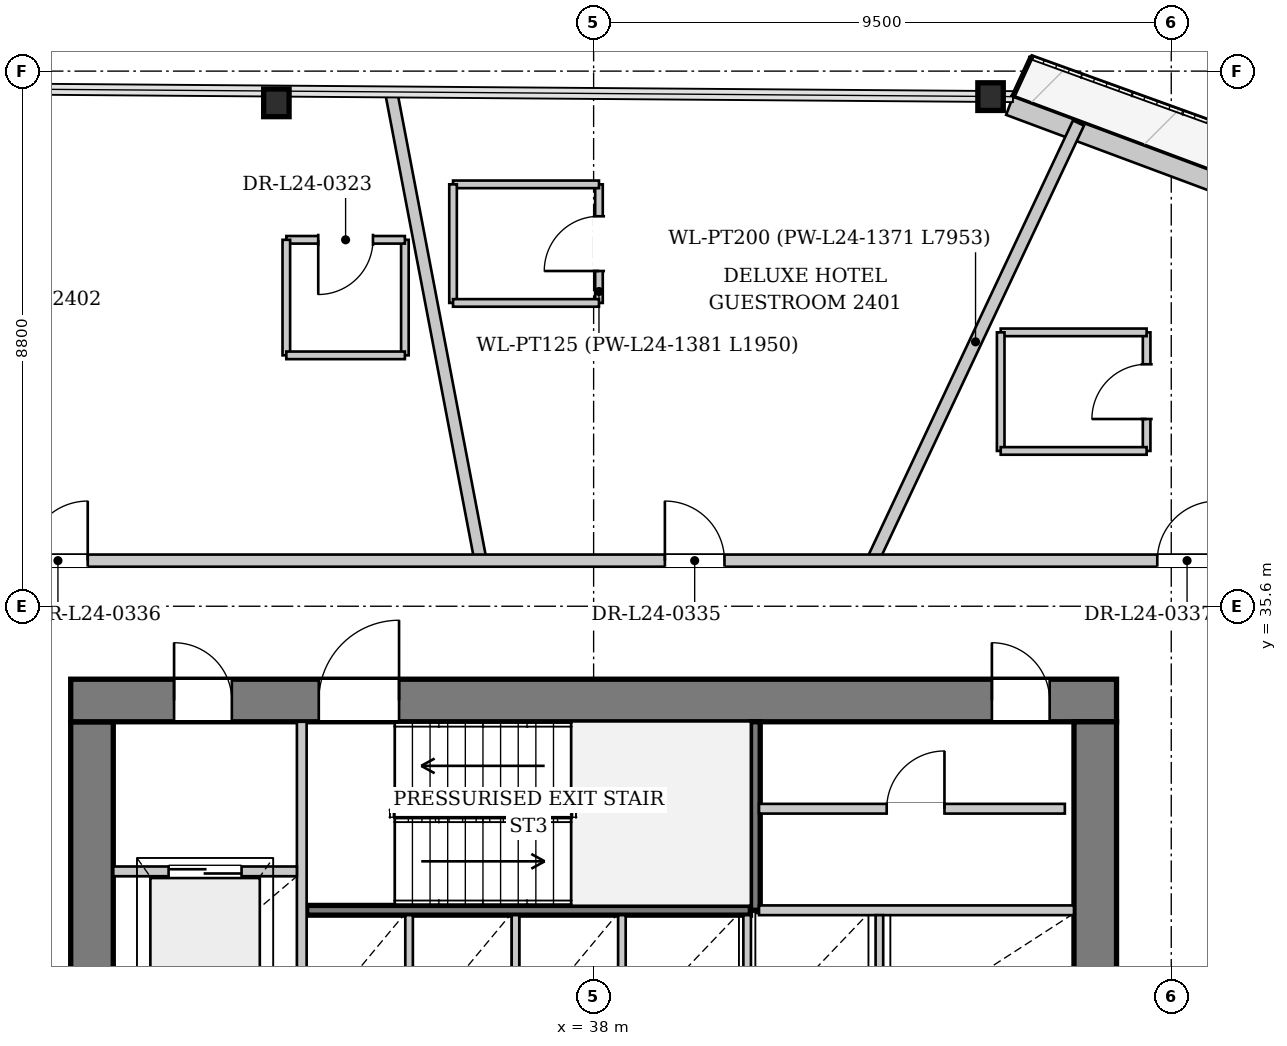
"""IFC4 building model, lengths in metres.
Left out: names, types, materials, properties, quantities, classifications, styles, units other than length and angle.
Written with IfcOpenShell. Run it as: python <this file> out.ifc"""

import sys

from ifc_helpers import new_model, si_unit, direction, frame, frame_2d, origin, origin_2d, place, context, subcontext, project, spatial, rectangle, i_section, extrude, source, transform, mapped, element, fill, save


model = new_model("IFC4")
c1 = context("Model", 3, precision=1e-05, world=origin(), true_north=direction((0.0, 1.0)))
c2 = subcontext(c1, "Body", "Model", "MODEL_VIEW")
j1 = project(units=[si_unit("LENGTHUNIT", "METRE"), si_unit("PLANEANGLEUNIT", "RADIAN")], contexts=[c1])
p1 = place(None, origin())
s1 = spatial("IfcSite", under=j1, at=p1, CompositionType="ELEMENT")
p2 = place(p1, origin())
s2 = spatial("IfcBuilding", under=s1, at=p2, CompositionType="ELEMENT")
p3 = place(p2, frame((0.0, 0.0, 95.05)))
s3 = spatial("IfcBuildingStorey", under=s2, at=p3, CompositionType="ELEMENT", Elevation=95.05)
m1 = source(origin(), c2, "Body", "SweptSolid", [
    extrude(i_section(OverallWidth=0.418, OverallDepth=0.455, WebThickness=0.038, FlangeThickness=0.059, at=origin_2d()), origin(), (0.0, 0.0, 1.0), 3.464),
])
p4 = place(p3, frame((44.896, 43.98, 0.0), z_axis=(-0.212555455601, 7.0475947e-05, 0.977149002623), x_axis=(-0.000331564969, -0.999999945032, 0.0)))
e1 = element("IfcColumn", 1, at=p4, inside=s3, PredefinedType="COLUMN", context=c2, shape_type="MappedRepresentation", body=[
    mapped(m1, transform((0.0, 0.0, 0.0), x_axis=(1.0, 0.0, 0.0), y_axis=(0.0, 1.0, 0.0), z_axis=(0.0, 0.0, 1.0), scale=1.0)),
])
m2 = source(origin(), c2, "Body", "SweptSolid", [
    extrude(i_section(OverallWidth=0.418, OverallDepth=0.455, WebThickness=0.038, FlangeThickness=0.059, at=origin_2d()), origin(), (0.0, 0.0, 1.0), 3.475),
])
p5 = place(p3, frame((33.125, 44.07, 0.0), z_axis=(-0.197223375333, -0.109958882222, 0.974172461345), x_axis=(0.486963333357, -0.873422413249, 0.0)))
e2 = element("IfcColumn", 2, at=p5, inside=s3, PredefinedType="COLUMN", context=c2, shape_type="MappedRepresentation", body=[
    mapped(m2, transform((0.0, 0.0, 0.0), x_axis=(1.0, 0.0, 0.0), y_axis=(0.0, 1.0, 0.0), z_axis=(0.0, 0.0, 1.0), scale=1.0)),
])
p6 = place(p3, frame((44.84, 43.831, 0.0), z_axis=(0.0, 0.0, 1.0), x_axis=(0.936918509678, -0.349547859704, 0.0)))
e3 = element("IfcWall", 3, at=p6, inside=s3, PredefinedType="SOLIDWALL", context=c2, shape_type="SweptSolid", body=[
    extrude(rectangle(XDim=23.543, YDim=0.32, at=frame_2d((11.771, 0.0))), origin(), (0.0, 0.0, 1.0), 2.692),
])
p7 = place(p6, frame((6.984, 0.0, 0.0)))
e4 = element("IfcOpeningElement", 4, at=p7, cuts=e3, PredefinedType="OPENING", context=c2, shape_type="SweptSolid", body=[
    extrude(rectangle(XDim=1.1, YDim=2.3, at=frame_2d((0.55, 1.15))), frame((0.0, 0.17, 0.0), z_axis=(0.0, -1.0, 0.0), x_axis=(1.0, 0.0, 0.0)), (0.0, 0.0, 1.0), 0.34),
])
p8 = place(p6, frame((16.522, 0.0, 0.372)))
e5 = element("IfcOpeningElement", 5, at=p8, cuts=e3, PredefinedType="OPENING", context=c2, shape_type="SweptSolid", body=[
    extrude(rectangle(XDim=1.8, YDim=2.2, at=frame_2d((0.9, 1.1))), frame((0.0, 0.17, 0.0), z_axis=(0.0, -1.0, 0.0), x_axis=(1.0, 0.0, 0.0)), (0.0, 0.0, 1.0), 0.34),
])
p9 = place(p3, frame((29.75, 19.5, 0.0), z_axis=(0.0, 0.0, 1.0), x_axis=(0.0, 1.0, 0.0)))
e6 = element("IfcWall", 6, at=p9, inside=s3, PredefinedType="SHEAR", context=c2, shape_type="SweptSolid", body=[
    extrude(rectangle(XDim=14.2, YDim=0.7, at=frame_2d((7.1, 0.0))), origin(), (0.0, 0.0, 1.0), 3.3),
])
p10 = place(p9, frame((7.42, 0.0, 0.0)))
e7 = element("IfcOpeningElement", 7, at=p10, cuts=e6, PredefinedType="OPENING", context=c2, shape_type="SweptSolid", body=[
    extrude(rectangle(XDim=1.6, YDim=2.2, at=frame_2d((0.8, 1.1))), frame((0.0, 0.36, 0.0), z_axis=(0.0, -1.0, 0.0), x_axis=(1.0, 0.0, 0.0)), (0.0, 0.0, 1.0), 0.72),
])
p11 = place(p3, frame((29.4, 34.05, 0.0), z_axis=(0.0, 0.0, 1.0), x_axis=(1.0, 0.0, 0.0)))
e8 = element("IfcWall", 8, at=p11, inside=s3, PredefinedType="SHEAR", context=c2, shape_type="SweptSolid", body=[
    extrude(rectangle(XDim=17.2, YDim=0.7, at=frame_2d((8.6, 0.0))), origin(), (0.0, 0.0, 1.0), 3.3),
])
p12 = place(p11, frame((1.7, 0.0, 0.0)))
e9 = element("IfcOpeningElement", 9, at=p12, cuts=e8, PredefinedType="OPENING", context=c2, shape_type="SweptSolid", body=[
    extrude(rectangle(XDim=0.95, YDim=2.1, at=frame_2d((0.475, 1.05))), frame((0.0, 0.36, 0.0), z_axis=(0.0, -1.0, 0.0), x_axis=(1.0, 0.0, 0.0)), (0.0, 0.0, 1.0), 0.72),
])
p13 = place(p11, frame((4.08, 0.0, 0.0)))
e10 = element("IfcOpeningElement", 10, at=p13, cuts=e8, PredefinedType="OPENING", context=c2, shape_type="SweptSolid", body=[
    extrude(rectangle(XDim=1.32, YDim=2.2, at=frame_2d((0.66, 1.1))), frame((0.0, 0.36, 0.0), z_axis=(0.0, -1.0, 0.0), x_axis=(1.0, 0.0, 0.0)), (0.0, 0.0, 1.0), 0.72),
])
p14 = place(p11, frame((15.15, 0.0, 0.0)))
e11 = element("IfcOpeningElement", 11, at=p14, cuts=e8, PredefinedType="OPENING", context=c2, shape_type="SweptSolid", body=[
    extrude(rectangle(XDim=0.95, YDim=2.1, at=frame_2d((0.475, 1.05))), frame((0.0, 0.36, 0.0), z_axis=(0.0, -1.0, 0.0), x_axis=(1.0, 0.0, 0.0)), (0.0, 0.0, 1.0), 0.72),
])
p15 = place(p3, frame((46.25, 33.7, 0.0), z_axis=(0.0, 0.0, 1.0), x_axis=(0.0, -1.0, 0.0)))
e12 = element("IfcWall", 12, at=p15, inside=s3, PredefinedType="SHEAR", context=c2, shape_type="SweptSolid", body=[
    extrude(rectangle(XDim=14.2, YDim=0.7, at=frame_2d((7.1, 0.0))), origin(), (0.0, 0.0, 1.0), 3.3),
])
p16 = place(p15, frame((5.18, 0.0, 0.0)))
e13 = element("IfcOpeningElement", 13, at=p16, cuts=e12, PredefinedType="OPENING", context=c2, shape_type="SweptSolid", body=[
    extrude(rectangle(XDim=1.6, YDim=2.2, at=frame_2d((0.8, 1.1))), frame((0.0, 0.36, 0.0), z_axis=(0.0, -1.0, 0.0), x_axis=(1.0, 0.0, 0.0)), (0.0, 0.0, 1.0), 0.72),
])
p17 = place(p3, frame((33.28, 30.6, 0.0), z_axis=(0.0, 0.0, 1.0), x_axis=(1.0, 0.0, 0.0)))
e14 = element("IfcWall", 14, at=p17, inside=s3, PredefinedType="PARTITIONING", context=c2, shape_type="SweptSolid", body=[
    extrude(rectangle(XDim=7.3, YDim=0.16, at=frame_2d((3.65, 0.0))), origin(), (0.0, 0.0, 1.0), 3.3),
])
p18 = place(p3, frame((40.66, 30.6, 0.0), z_axis=(0.0, 0.0, 1.0), x_axis=(0.0, 1.0, 0.0)))
e15 = element("IfcWall", 15, at=p18, inside=s3, PredefinedType="PARTITIONING", context=c2, shape_type="SweptSolid", body=[
    extrude(rectangle(XDim=3.1, YDim=0.16, at=frame_2d((1.55, 0.0))), origin(), (0.0, 0.0, 1.0), 3.3),
])
p19 = place(p3, frame((33.2, 28.44, 0.0), z_axis=(0.0, 0.0, 1.0), x_axis=(0.0, 1.0, 0.0)))
e16 = element("IfcWall", 16, at=p19, inside=s3, PredefinedType="PARTITIONING", context=c2, shape_type="SweptSolid", body=[
    extrude(rectangle(XDim=5.26, YDim=0.16, at=frame_2d((2.63, 0.0))), origin(), (0.0, 0.0, 1.0), 3.3),
])
p20 = place(p3, frame((30.1, 31.24, 0.0), z_axis=(0.0, 0.0, 1.0), x_axis=(1.0, 0.0, 0.0)))
e17 = element("IfcWall", 17, at=p20, inside=s3, PredefinedType="PARTITIONING", context=c2, shape_type="SweptSolid", body=[
    extrude(rectangle(XDim=3.02, YDim=0.16, at=frame_2d((1.51, 0.0))), origin(), (0.0, 0.0, 1.0), 3.3),
])
p21 = place(p20, frame((0.91, 0.0, 0.0)))
e18 = element("IfcOpeningElement", 18, at=p21, cuts=e17, PredefinedType="OPENING", context=c2, shape_type="SweptSolid", body=[
    extrude(rectangle(XDim=1.2, YDim=2.2, at=frame_2d((0.6, 1.1))), frame((0.0, 0.09, 0.0), z_axis=(0.0, -1.0, 0.0), x_axis=(1.0, 0.0, 0.0)), (0.0, 0.0, 1.0), 0.18),
])
p22 = place(p3, frame((40.72, 30.6, 0.0), z_axis=(0.0, 0.0, 1.0), x_axis=(1.0, 0.0, 0.0)))
e19 = element("IfcWall", 19, at=p22, inside=s3, PredefinedType="PARTITIONING", context=c2, shape_type="SweptSolid", body=[
    extrude(rectangle(XDim=5.18, YDim=0.16, at=frame_2d((2.59, 0.0))), origin(), (0.0, 0.0, 1.0), 3.3),
])
for number, where, z_axis, x_axis in (
    (20, (34.965, 28.6, 0.0), (0.0, 0.0, 1.0), (0.0, 1.0, 0.0)),
    (21, (36.715, 28.6, 0.0), (0.0, 0.0, 1.0), (0.0, 1.0, 0.0)),
    (22, (38.465, 28.6, 0.0), (0.0, 0.0, 1.0), (0.0, 1.0, 0.0)),
    (23, (40.525, 28.6, 0.0), (0.0, 0.0, 1.0), (0.0, 1.0, 0.0)),
    (24, (42.7, 28.6, 0.0), (0.0, 0.0, 1.0), (0.0, 1.0, 0.0)),
):
    element("IfcWall", number, at=place(p3, frame(where, z_axis=z_axis, x_axis=x_axis)), inside=s3, PredefinedType="PARTITIONING", context=c2, shape_type="SweptSolid", body=[
        extrude(rectangle(XDim=1.92, YDim=0.125, at=frame_2d((0.96, 0.0))), origin(), (0.0, 0.0, 1.0), 3.3),
    ])
p23 = place(p3, frame((40.72, 32.27, 0.0), z_axis=(0.0, 0.0, 1.0), x_axis=(1.0, 0.0, 0.0)))
e25 = element("IfcWall", 25, at=p23, inside=s3, PredefinedType="PARTITIONING", context=c2, shape_type="SweptSolid", body=[
    extrude(rectangle(XDim=5.03, YDim=0.16, at=frame_2d((2.515, 0.0))), origin(), (0.0, 0.0, 1.0), 3.3),
])
p24 = place(p23, frame((2.1, 0.0, 0.0)))
e26 = element("IfcOpeningElement", 26, at=p24, cuts=e25, PredefinedType="OPENING", context=c2, shape_type="SweptSolid", body=[
    extrude(rectangle(XDim=0.95, YDim=2.1, at=frame_2d((0.475, 1.05))), frame((0.0, 0.09, 0.0), z_axis=(0.0, -1.0, 0.0), x_axis=(1.0, 0.0, 0.0)), (0.0, 0.0, 1.0), 0.18),
])
p25 = place(p3, frame((42.588, 36.35, 0.0), z_axis=(0.0, 0.0, 1.0), x_axis=(0.425795558012, 0.904819397878, 0.0)))
e27 = element("IfcWall", 27, at=p25, inside=s3, PredefinedType="PARTITIONING", context=c2, shape_type="SweptSolid", body=[
    extrude(rectangle(XDim=7.953, YDim=0.2, at=frame_2d((3.977, 0.0))), origin(), (0.0, 0.0, 1.0), 3.3),
])
p26 = place(p3, frame((36.14, 36.35, 0.0), z_axis=(0.0, 0.0, 1.0), x_axis=(-0.187380505686, 0.982287405034, 0.0)))
e28 = element("IfcWall", 28, at=p26, inside=s3, PredefinedType="PARTITIONING", context=c2, shape_type="SweptSolid", body=[
    extrude(rectangle(XDim=7.816, YDim=0.2, at=frame_2d((3.908, 0.0))), origin(), (0.0, 0.0, 1.0), 3.3),
])
p27 = place(p3, frame((38.088, 40.588, 0.0), z_axis=(0.0, 0.0, 1.0), x_axis=(0.0, 1.0, 0.0)))
e29 = element("IfcWall", 29, at=p27, inside=s3, PredefinedType="PARTITIONING", context=c2, shape_type="SweptSolid", body=[
    extrude(rectangle(XDim=1.95, YDim=0.125, at=frame_2d((0.975, 0.0))), origin(), (0.0, 0.0, 1.0), 3.3),
])
p28 = place(p27, frame((0.525, 0.0, 0.0)))
e30 = element("IfcOpeningElement", 30, at=p28, cuts=e29, PredefinedType="OPENING", context=c2, shape_type="SweptSolid", body=[
    extrude(rectangle(XDim=0.9, YDim=2.1, at=frame_2d((0.45, 1.05))), frame((0.0, 0.073, 0.0), z_axis=(0.0, -1.0, 0.0), x_axis=(1.0, 0.0, 0.0)), (0.0, 0.0, 1.0), 0.145),
])
p29 = place(p3, frame((38.088, 42.538, 0.0), z_axis=(0.0, 0.0, 1.0), x_axis=(-1.0, 0.0, 0.0)))
e31 = element("IfcWall", 31, at=p29, inside=s3, PredefinedType="PARTITIONING", context=c2, shape_type="SweptSolid", body=[
    extrude(rectangle(XDim=2.4, YDim=0.125, at=frame_2d((1.2, 0.0))), origin(), (0.0, 0.0, 1.0), 3.3),
])
p30 = place(p3, frame((35.688, 42.538, 0.0), z_axis=(0.0, 0.0, 1.0), x_axis=(0.0, -1.0, 0.0)))
e32 = element("IfcWall", 32, at=p30, inside=s3, PredefinedType="PARTITIONING", context=c2, shape_type="SweptSolid", body=[
    extrude(rectangle(XDim=1.95, YDim=0.125, at=frame_2d((0.975, 0.0))), origin(), (0.0, 0.0, 1.0), 3.3),
])
p31 = place(p3, frame((35.688, 40.588, 0.0), z_axis=(0.0, 0.0, 1.0), x_axis=(1.0, 0.0, 0.0)))
e33 = element("IfcWall", 33, at=p31, inside=s3, PredefinedType="PARTITIONING", context=c2, shape_type="SweptSolid", body=[
    extrude(rectangle(XDim=2.4, YDim=0.125, at=frame_2d((1.2, 0.0))), origin(), (0.0, 0.0, 1.0), 3.3),
])
p32 = place(p3, frame((34.896, 39.726, 0.0), z_axis=(0.0, 0.0, 1.0), x_axis=(0.0, 1.0, 0.0)))
e34 = element("IfcWall", 34, at=p32, inside=s3, PredefinedType="PARTITIONING", context=c2, shape_type="SweptSolid", body=[
    extrude(rectangle(XDim=1.9, YDim=0.125, at=frame_2d((0.95, 0.0))), origin(), (0.0, 0.0, 1.0), 3.3),
])
p33 = place(p3, frame((34.896, 41.626, 0.0), z_axis=(0.0, 0.0, 1.0), x_axis=(-1.0, 0.0, 0.0)))
e35 = element("IfcWall", 35, at=p33, inside=s3, PredefinedType="PARTITIONING", context=c2, shape_type="SweptSolid", body=[
    extrude(rectangle(XDim=1.95, YDim=0.125, at=frame_2d((0.975, 0.0))), origin(), (0.0, 0.0, 1.0), 3.3),
])
p34 = place(p33, frame((0.525, 0.0, 0.0)))
e36 = element("IfcOpeningElement", 36, at=p34, cuts=e35, PredefinedType="OPENING", context=c2, shape_type="SweptSolid", body=[
    extrude(rectangle(XDim=0.9, YDim=2.1, at=frame_2d((0.45, 1.05))), frame((0.0, 0.073, 0.0), z_axis=(0.0, -1.0, 0.0), x_axis=(1.0, 0.0, 0.0)), (0.0, 0.0, 1.0), 0.145),
])
p35 = place(p3, frame((32.946, 41.626, 0.0), z_axis=(0.0, 0.0, 1.0), x_axis=(0.0, -1.0, 0.0)))
e37 = element("IfcWall", 37, at=p35, inside=s3, PredefinedType="PARTITIONING", context=c2, shape_type="SweptSolid", body=[
    extrude(rectangle(XDim=1.9, YDim=0.125, at=frame_2d((0.95, 0.0))), origin(), (0.0, 0.0, 1.0), 3.3),
])
p36 = place(p3, frame((32.946, 39.726, 0.0), z_axis=(0.0, 0.0, 1.0), x_axis=(1.0, 0.0, 0.0)))
e38 = element("IfcWall", 38, at=p36, inside=s3, PredefinedType="PARTITIONING", context=c2, shape_type="SweptSolid", body=[
    extrude(rectangle(XDim=1.95, YDim=0.125, at=frame_2d((0.975, 0.0))), origin(), (0.0, 0.0, 1.0), 3.3),
])
p37 = place(p3, frame((47.095, 38.154, 0.0), z_axis=(0.0, 0.0, 1.0), x_axis=(0.0, 1.0, 0.0)))
e39 = element("IfcWall", 39, at=p37, inside=s3, PredefinedType="PARTITIONING", context=c2, shape_type="SweptSolid", body=[
    extrude(rectangle(XDim=1.95, YDim=0.125, at=frame_2d((0.975, 0.0))), origin(), (0.0, 0.0, 1.0), 3.3),
])
p38 = place(p37, frame((0.525, 0.0, 0.0)))
e40 = element("IfcOpeningElement", 40, at=p38, cuts=e39, PredefinedType="OPENING", context=c2, shape_type="SweptSolid", body=[
    extrude(rectangle(XDim=0.9, YDim=2.1, at=frame_2d((0.45, 1.05))), frame((0.0, 0.073, 0.0), z_axis=(0.0, -1.0, 0.0), x_axis=(1.0, 0.0, 0.0)), (0.0, 0.0, 1.0), 0.145),
])
p39 = place(p3, frame((47.095, 40.104, 0.0), z_axis=(0.0, 0.0, 1.0), x_axis=(-1.0, 0.0, 0.0)))
e41 = element("IfcWall", 41, at=p39, inside=s3, PredefinedType="PARTITIONING", context=c2, shape_type="SweptSolid", body=[
    extrude(rectangle(XDim=2.4, YDim=0.125, at=frame_2d((1.2, 0.0))), origin(), (0.0, 0.0, 1.0), 3.3),
])
p40 = place(p3, frame((44.695, 40.104, 0.0), z_axis=(0.0, 0.0, 1.0), x_axis=(0.0, -1.0, 0.0)))
e42 = element("IfcWall", 42, at=p40, inside=s3, PredefinedType="PARTITIONING", context=c2, shape_type="SweptSolid", body=[
    extrude(rectangle(XDim=1.95, YDim=0.125, at=frame_2d((0.975, 0.0))), origin(), (0.0, 0.0, 1.0), 3.3),
])
p41 = place(p3, frame((44.695, 38.154, 0.0), z_axis=(0.0, 0.0, 1.0), x_axis=(1.0, 0.0, 0.0)))
e43 = element("IfcWall", 43, at=p41, inside=s3, PredefinedType="PARTITIONING", context=c2, shape_type="SweptSolid", body=[
    extrude(rectangle(XDim=2.4, YDim=0.125, at=frame_2d((1.2, 0.0))), origin(), (0.0, 0.0, 1.0), 2.985),
])
p42 = place(p3, frame((27.45, 36.35, 0.0), z_axis=(0.0, 0.0, 1.0), x_axis=(1.0, 0.0, 0.0)))
e44 = element("IfcWall", 44, at=p42, inside=s3, PredefinedType="PARTITIONING", context=c2, shape_type="SweptSolid", body=[
    extrude(rectangle(XDim=21.1, YDim=0.2, at=frame_2d((10.55, 0.0))), origin(), (0.0, 0.0, 1.0), 3.3),
])
p43 = place(p42, frame((11.722, 0.0, 0.0)))
e45 = element("IfcOpeningElement", 45, at=p43, cuts=e44, PredefinedType="OPENING", context=c2, shape_type="SweptSolid", body=[
    extrude(rectangle(XDim=0.98, YDim=2.15, at=frame_2d((0.49, 1.075))), frame((0.0, 0.11, 0.0), z_axis=(0.0, -1.0, 0.0), x_axis=(1.0, 0.0, 0.0)), (0.0, 0.0, 1.0), 0.22),
])
p44 = place(p42, frame((1.25, 0.0, 0.0)))
e46 = element("IfcOpeningElement", 46, at=p44, cuts=e44, PredefinedType="OPENING", context=c2, shape_type="SweptSolid", body=[
    extrude(rectangle(XDim=0.98, YDim=2.15, at=frame_2d((0.49, 1.075))), frame((0.0, 0.11, 0.0), z_axis=(0.0, -1.0, 0.0), x_axis=(1.0, 0.0, 0.0)), (0.0, 0.0, 1.0), 0.22),
])
p45 = place(p42, frame((19.82, 0.0, 0.0)))
e47 = element("IfcOpeningElement", 47, at=p45, cuts=e44, PredefinedType="OPENING", context=c2, shape_type="SweptSolid", body=[
    extrude(rectangle(XDim=0.98, YDim=2.15, at=frame_2d((0.49, 1.075))), frame((0.0, 0.11, 0.0), z_axis=(0.0, -1.0, 0.0), x_axis=(1.0, 0.0, 0.0)), (0.0, 0.0, 1.0), 0.22),
])
m3 = source(origin(), c2, "Body", "SweptSolid", [
    extrude(rectangle(XDim=0.95, YDim=2.1, at=frame_2d((0.475, 1.05))), frame((0.0, 0.025, 0.0), z_axis=(0.0, -1.0, 0.0), x_axis=(1.0, 0.0, 0.0)), (0.0, 0.0, 1.0), 0.05),
])
p46 = place(p12, origin())
e48 = element("IfcDoor", 48, at=p46, inside=s3, OperationType="SINGLE_SWING_LEFT", PredefinedType="DOOR", context=c2, shape_type="MappedRepresentation", body=[
    mapped(m3, transform((0.0, 0.0, 0.0), x_axis=(1.0, 0.0, 0.0), y_axis=(0.0, 1.0, 0.0), z_axis=(0.0, 0.0, 1.0), scale=1.0)),
])
fill(e9, e48)
m4 = source(origin(), c2, "Body", "SweptSolid", [
    extrude(rectangle(XDim=1.32, YDim=2.2, at=frame_2d((0.66, 1.1))), frame((0.0, 0.025, 0.0), z_axis=(0.0, -1.0, 0.0), x_axis=(1.0, 0.0, 0.0)), (0.0, 0.0, 1.0), 0.05),
])
p47 = place(p13, origin())
e49 = element("IfcDoor", 49, at=p47, inside=s3, OperationType="SINGLE_SWING_RIGHT", PredefinedType="DOOR", context=c2, shape_type="MappedRepresentation", body=[
    mapped(m4, transform((0.0, 0.0, 0.0), x_axis=(1.0, 0.0, 0.0), y_axis=(0.0, 1.0, 0.0), z_axis=(0.0, 0.0, 1.0), scale=1.0)),
])
fill(e10, e49)
m5 = source(origin(), c2, "Body", "SweptSolid", [
    extrude(rectangle(XDim=1.2, YDim=2.2, at=frame_2d((0.6, 1.1))), frame((0.0, 0.025, 0.0), z_axis=(0.0, -1.0, 0.0), x_axis=(1.0, 0.0, 0.0)), (0.0, 0.0, 1.0), 0.05),
])
p48 = place(p21, origin())
e50 = element("IfcDoor", 50, at=p48, inside=s3, OperationType="DOUBLE_DOOR_SLIDING", PredefinedType="DOOR", context=c2, shape_type="MappedRepresentation", body=[
    mapped(m5, transform((0.0, 0.0, 0.0), x_axis=(1.0, 0.0, 0.0), y_axis=(0.0, 1.0, 0.0), z_axis=(0.0, 0.0, 1.0), scale=1.0)),
])
fill(e18, e50)
p49 = place(p24, origin())
e51 = element("IfcDoor", 51, at=p49, inside=s3, OperationType="SINGLE_SWING_RIGHT", PredefinedType="DOOR", context=c2, shape_type="MappedRepresentation", body=[
    mapped(m3, transform((0.0, 0.0, 0.0), x_axis=(1.0, 0.0, 0.0), y_axis=(0.0, 1.0, 0.0), z_axis=(0.0, 0.0, 1.0), scale=1.0)),
])
fill(e26, e51)
p50 = place(p14, origin())
e52 = element("IfcDoor", 52, at=p50, inside=s3, OperationType="SINGLE_SWING_LEFT", PredefinedType="DOOR", context=c2, shape_type="MappedRepresentation", body=[
    mapped(m3, transform((0.0, 0.0, 0.0), x_axis=(1.0, 0.0, 0.0), y_axis=(0.0, 1.0, 0.0), z_axis=(0.0, 0.0, 1.0), scale=1.0)),
])
fill(e11, e52)
m6 = source(origin(), c2, "Body", "SweptSolid", [
    extrude(rectangle(XDim=0.9, YDim=2.1, at=frame_2d((0.45, 1.05))), frame((0.0, 0.025, 0.0), z_axis=(0.0, -1.0, 0.0), x_axis=(1.0, 0.0, 0.0)), (0.0, 0.0, 1.0), 0.05),
])
p51 = place(p28, origin())
e53 = element("IfcDoor", 53, at=p51, inside=s3, OperationType="SINGLE_SWING_LEFT", PredefinedType="DOOR", context=c2, shape_type="MappedRepresentation", body=[
    mapped(m6, transform((0.0, 0.0, 0.0), x_axis=(1.0, 0.0, 0.0), y_axis=(0.0, 1.0, 0.0), z_axis=(0.0, 0.0, 1.0), scale=1.0)),
])
fill(e30, e53)
p52 = place(p34, origin())
e54 = element("IfcDoor", 54, at=p52, inside=s3, OperationType="SINGLE_SWING_RIGHT", PredefinedType="DOOR", context=c2, shape_type="MappedRepresentation", body=[
    mapped(m6, transform((0.0, 0.0, 0.0), x_axis=(1.0, 0.0, 0.0), y_axis=(0.0, 1.0, 0.0), z_axis=(0.0, 0.0, 1.0), scale=1.0)),
])
fill(e36, e54)
p53 = place(p38, origin())
e55 = element("IfcDoor", 55, at=p53, inside=s3, OperationType="SINGLE_SWING_LEFT", PredefinedType="DOOR", context=c2, shape_type="MappedRepresentation", body=[
    mapped(m6, transform((0.0, 0.0, 0.0), x_axis=(1.0, 0.0, 0.0), y_axis=(0.0, 1.0, 0.0), z_axis=(0.0, 0.0, 1.0), scale=1.0)),
])
fill(e40, e55)
m7 = source(origin(), c2, "Body", "SweptSolid", [
    extrude(rectangle(XDim=0.98, YDim=2.15, at=frame_2d((0.49, 1.075))), frame((0.0, 0.025, 0.0), z_axis=(0.0, -1.0, 0.0), x_axis=(1.0, 0.0, 0.0)), (0.0, 0.0, 1.0), 0.05),
])
p54 = place(p43, origin())
e56 = element("IfcDoor", 56, at=p54, inside=s3, OperationType="SINGLE_SWING_LEFT", PredefinedType="DOOR", context=c2, shape_type="MappedRepresentation", body=[
    mapped(m7, transform((0.0, 0.0, 0.0), x_axis=(1.0, 0.0, 0.0), y_axis=(0.0, 1.0, 0.0), z_axis=(0.0, 0.0, 1.0), scale=1.0)),
])
fill(e45, e56)
p55 = place(p44, origin())
e57 = element("IfcDoor", 57, at=p55, inside=s3, OperationType="SINGLE_SWING_RIGHT", PredefinedType="DOOR", context=c2, shape_type="MappedRepresentation", body=[
    mapped(m7, transform((0.0, 0.0, 0.0), x_axis=(1.0, 0.0, 0.0), y_axis=(0.0, 1.0, 0.0), z_axis=(0.0, 0.0, 1.0), scale=1.0)),
])
fill(e46, e57)
p56 = place(p45, origin())
e58 = element("IfcDoor", 58, at=p56, inside=s3, OperationType="SINGLE_SWING_RIGHT", PredefinedType="DOOR", context=c2, shape_type="MappedRepresentation", body=[
    mapped(m7, transform((0.0, 0.0, 0.0), x_axis=(1.0, 0.0, 0.0), y_axis=(0.0, 1.0, 0.0), z_axis=(0.0, 0.0, 1.0), scale=1.0)),
])
fill(e47, e58)
save(model, sys.argv[1])
